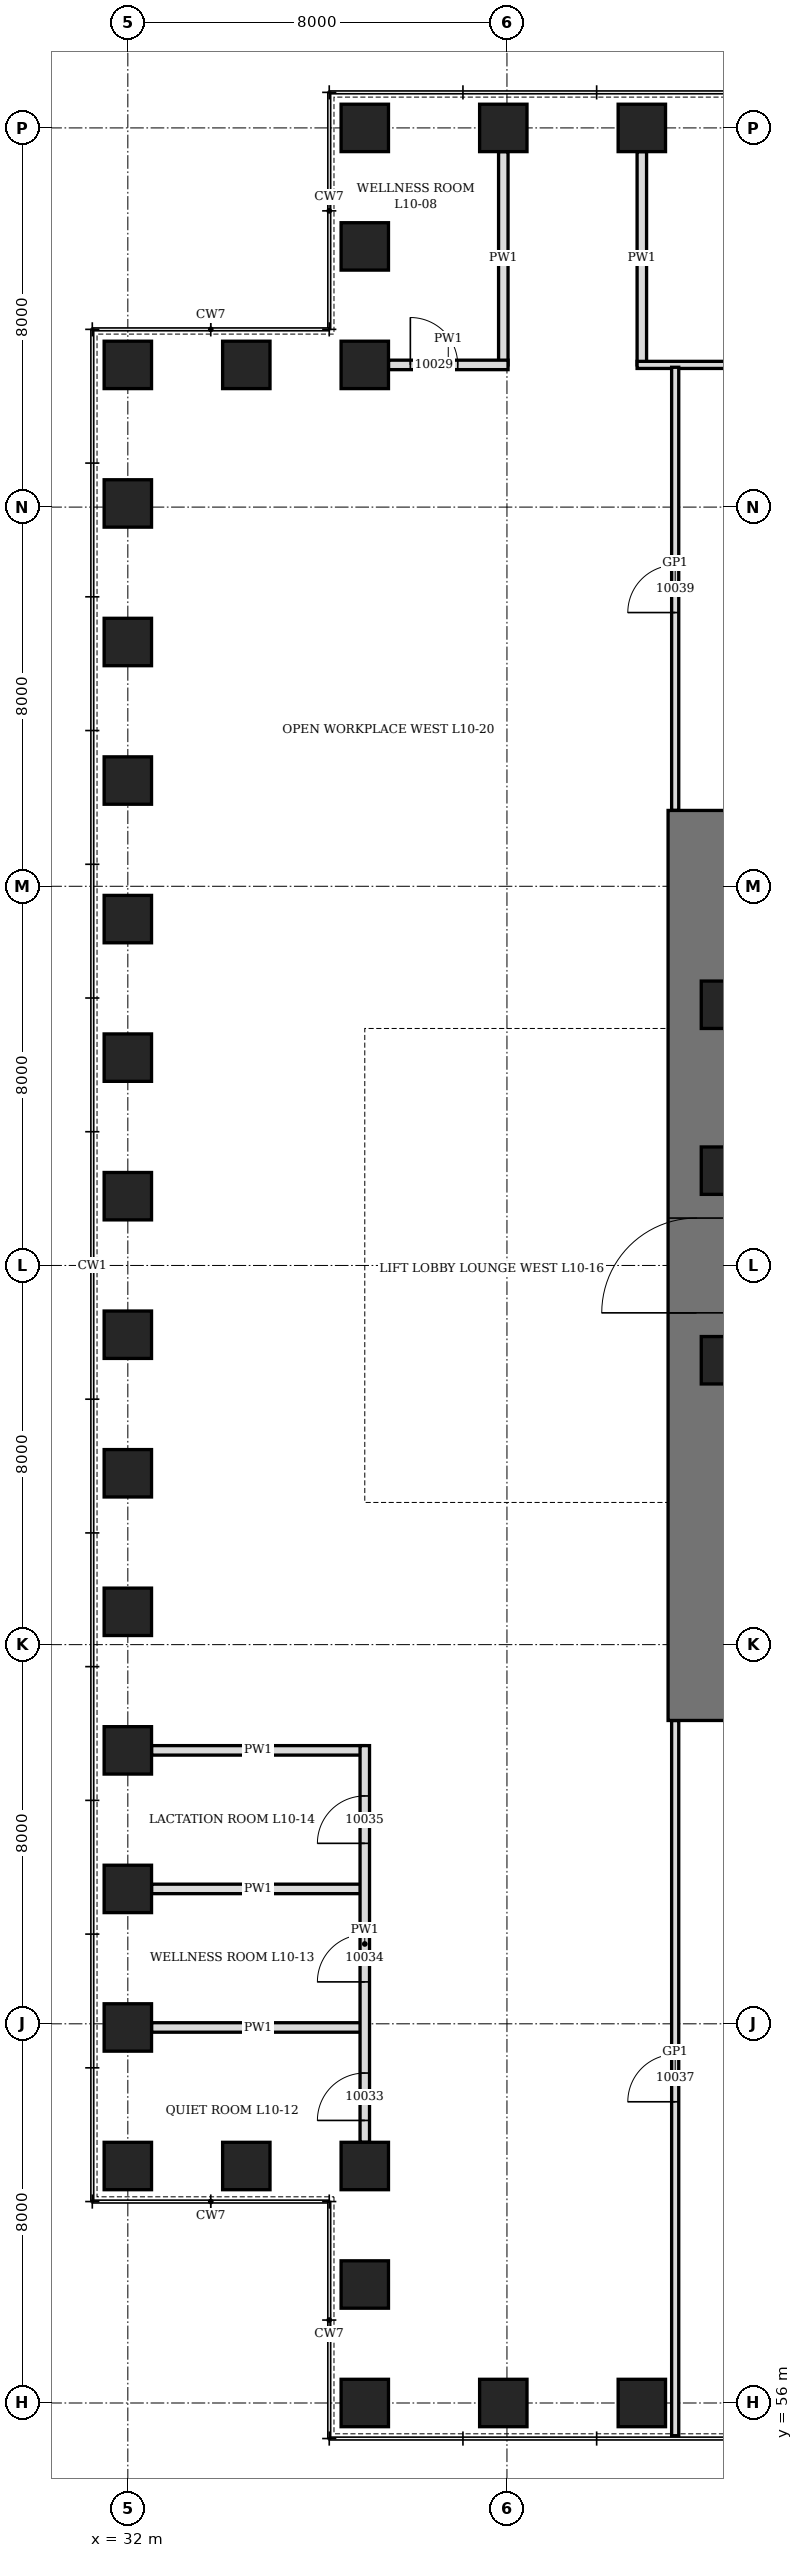
"""IFC4 building model, lengths in metres.
Left out: names, types, materials, properties, quantities, classifications, styles, units other than length and angle.
Written with IfcOpenShell. Run it as: python <this file> out.ifc"""

import sys

from ifc_helpers import new_model, si_unit, direction, frame, frame_2d, origin, origin_2d, place, context, subcontext, project, spatial, rectangle, hollow_rectangle, extrude, element, fill, save


model = new_model("IFC4")
c1 = context("Model", 3, precision=1e-05, world=origin(), true_north=direction((0.0, 1.0)))
c2 = subcontext(c1, "Body", "Model", "MODEL_VIEW")
j1 = project(units=[si_unit("LENGTHUNIT", "METRE"), si_unit("PLANEANGLEUNIT", "RADIAN")], contexts=[c1])
p1 = place(None, origin())
s1 = spatial("IfcSite", under=j1, at=p1, CompositionType="ELEMENT")
p2 = place(p1, origin())
s2 = spatial("IfcBuilding", under=s1, at=p2, CompositionType="ELEMENT")
p3 = place(p2, frame((0.0, 0.0, 51.7)))
s3 = spatial("IfcBuildingStorey", under=s2, at=p3, CompositionType="ELEMENT", Elevation=51.7)
for number, where, z_axis, x_axis in (
    (1, (37.0, 56.0, 0.0), (0.0, 0.0, 1.0), (1.0, 0.0, 0.0)),
    (2, (39.923, 56.0, 0.0), (0.0, 0.0, 1.0), (1.0, 0.0, 0.0)),
    (3, (42.846, 56.0, 0.0), (0.0, 0.0, 1.0), (1.0, 0.0, 0.0)),
    (4, (42.846, 104.0, 0.0), (0.0, 0.0, 1.0), (1.0, 0.0, 0.0)),
    (5, (39.923, 104.0, 0.0), (0.0, 0.0, 1.0), (1.0, 0.0, 0.0)),
    (6, (37.0, 104.0, 0.0), (0.0, 0.0, 1.0), (0.0, 1.0, 0.0)),
    (7, (37.0, 101.5, 0.0), (0.0, 0.0, 1.0), (0.0, 1.0, 0.0)),
    (8, (37.0, 99.0, 0.0), (0.0, 0.0, 1.0), (1.0, 0.0, 0.0)),
    (9, (34.5, 99.0, 0.0), (0.0, 0.0, 1.0), (1.0, 0.0, 0.0)),
    (10, (32.0, 99.0, 0.0), (0.0, 0.0, 1.0), (0.0, 1.0, 0.0)),
    (11, (32.0, 96.077, 0.0), (0.0, 0.0, 1.0), (0.0, 1.0, 0.0)),
    (12, (32.0, 93.154, 0.0), (0.0, 0.0, 1.0), (0.0, 1.0, 0.0)),
    (13, (32.0, 90.231, 0.0), (0.0, 0.0, 1.0), (0.0, 1.0, 0.0)),
    (14, (32.0, 87.308, 0.0), (0.0, 0.0, 1.0), (0.0, 1.0, 0.0)),
    (15, (32.0, 84.385, 0.0), (0.0, 0.0, 1.0), (0.0, 1.0, 0.0)),
    (16, (32.0, 81.461, 0.0), (0.0, 0.0, 1.0), (0.0, 1.0, 0.0)),
    (17, (32.0, 78.539, 0.0), (0.0, 0.0, 1.0), (0.0, 1.0, 0.0)),
    (18, (32.0, 75.615, 0.0), (0.0, 0.0, 1.0), (0.0, 1.0, 0.0)),
    (19, (32.0, 72.692, 0.0), (0.0, 0.0, 1.0), (0.0, 1.0, 0.0)),
    (20, (32.0, 69.769, 0.0), (0.0, 0.0, 1.0), (0.0, 1.0, 0.0)),
    (21, (32.0, 66.846, 0.0), (0.0, 0.0, 1.0), (0.0, 1.0, 0.0)),
    (22, (32.0, 63.923, 0.0), (0.0, 0.0, 1.0), (0.0, 1.0, 0.0)),
    (23, (32.0, 61.0, 0.0), (0.0, 0.0, 1.0), (1.0, 0.0, 0.0)),
    (24, (34.5, 61.0, 0.0), (0.0, 0.0, 1.0), (1.0, 0.0, 0.0)),
    (25, (37.0, 61.0, 0.0), (0.0, 0.0, 1.0), (0.0, 1.0, 0.0)),
    (26, (37.0, 58.5, 0.0), (0.0, 0.0, 1.0), (0.0, 1.0, 0.0)),
):
    element("IfcColumn", number, at=place(p3, frame(where, z_axis=z_axis, x_axis=x_axis)), inside=s3, PredefinedType="COLUMN", context=c2, shape_type="SweptSolid", body=[
        extrude(hollow_rectangle(XDim=1.0, YDim=1.0, WallThickness=0.25, at=origin_2d()), origin(), (0.0, 0.0, 1.0), 4.2),
    ])
p4 = place(p3, frame((44.0, 70.4, 0.0), z_axis=(0.0, 0.0, 1.0), x_axis=(0.0, 1.0, 0.0)))
e27 = element("IfcWall", 27, at=p4, inside=s3, PredefinedType="SHEAR", context=c2, shape_type="SweptSolid", body=[
    extrude(rectangle(XDim=19.2, YDim=1.2, at=frame_2d((9.6, 0.0))), origin(), (0.0, 0.0, 1.0), 4.2),
])
p5 = place(p4, frame((8.6, 0.0, 0.0)))
e28 = element("IfcOpeningElement", 28, at=p5, cuts=e27, PredefinedType="OPENING", context=c2, shape_type="SweptSolid", body=[
    extrude(rectangle(XDim=2.0, YDim=2.4, at=frame_2d((1.0, 1.2))), frame((0.0, 0.61, 0.0), z_axis=(0.0, -1.0, 0.0), x_axis=(1.0, 0.0, 0.0)), (0.0, 0.0, 1.0), 1.22),
])
for number, where, z_axis, x_axis in (
    (29, (44.6, 78.0, 0.0), (0.0, 0.0, 1.0), (1.0, 0.0, 0.0)),
    (30, (44.6, 82.0, 0.0), (0.0, 0.0, 1.0), (1.0, 0.0, 0.0)),
    (31, (44.6, 85.5, 0.0), (0.0, 0.0, 1.0), (1.0, 0.0, 0.0)),
):
    element("IfcColumn", number, at=place(p3, frame(where, z_axis=z_axis, x_axis=x_axis)), inside=s3, PredefinedType="COLUMN", context=c2, shape_type="SweptSolid", body=[
        extrude(hollow_rectangle(XDim=1.0, YDim=1.0, WallThickness=0.15, at=origin_2d()), origin(), (0.0, 0.0, 1.0), 4.2),
    ])
p6 = place(p3, frame((39.923, 99.0, 0.0), z_axis=(0.0, 0.0, 1.0), x_axis=(0.0, 1.0, 0.0)))
e32 = element("IfcWall", 32, at=p6, inside=s3, PredefinedType="PARTITIONING", context=c2, shape_type="SweptSolid", body=[
    extrude(rectangle(XDim=4.5, YDim=0.2, at=frame_2d((2.25, 0.0))), origin(), (0.0, 0.0, 1.0), 3.428),
])
p7 = place(p3, frame((42.846, 99.0, 0.0), z_axis=(0.0, 0.0, 1.0), x_axis=(0.0, 1.0, 0.0)))
e33 = element("IfcWall", 33, at=p7, inside=s3, PredefinedType="PARTITIONING", context=c2, shape_type="SweptSolid", body=[
    extrude(rectangle(XDim=4.5, YDim=0.2, at=frame_2d((2.25, 0.0))), origin(), (0.0, 0.0, 1.0), 3.278),
])
for number, where, z_axis, x_axis in (
    (34, (32.5, 63.923, 0.0), (0.0, 0.0, 1.0), (1.0, 0.0, 0.0)),
    (35, (32.5, 66.846, 0.0), (0.0, 0.0, 1.0), (1.0, 0.0, 0.0)),
    (36, (32.5, 69.769, 0.0), (0.0, 0.0, 1.0), (1.0, 0.0, 0.0)),
):
    element("IfcWall", number, at=place(p3, frame(where, z_axis=z_axis, x_axis=x_axis)), inside=s3, PredefinedType="PARTITIONING", context=c2, shape_type="SweptSolid", body=[
        extrude(rectangle(XDim=4.5, YDim=0.2, at=frame_2d((2.25, 0.0))), origin(), (0.0, 0.0, 1.0), 3.428),
    ])
p8 = place(p3, frame((42.746, 99.0, 0.0), z_axis=(0.0, 0.0, 1.0), x_axis=(1.0, 0.0, 0.0)))
e37 = element("IfcWall", 37, at=p8, inside=s3, PredefinedType="PARTITIONING", context=c2, shape_type="SweptSolid", body=[
    extrude(rectangle(XDim=8.969, YDim=0.15, at=frame_2d((4.485, 0.0))), origin(), (0.0, 0.0, 1.0), 4.04),
])
p9 = place(p8, frame((3.985, 0.0, 0.0)))
e38 = element("IfcOpeningElement", 38, at=p9, cuts=e37, PredefinedType="OPENING", context=c2, shape_type="SweptSolid", body=[
    extrude(rectangle(XDim=1.0, YDim=2.4, at=frame_2d((0.5, 1.2))), frame((0.0, 0.085, 0.0), z_axis=(0.0, -1.0, 0.0), x_axis=(1.0, 0.0, 0.0)), (0.0, 0.0, 1.0), 0.17),
])
p10 = place(p3, frame((37.5, 99.0, 0.0), z_axis=(0.0, 0.0, 1.0), x_axis=(1.0, 0.0, 0.0)))
e39 = element("IfcWall", 39, at=p10, inside=s3, PredefinedType="PARTITIONING", context=c2, shape_type="SweptSolid", body=[
    extrude(rectangle(XDim=2.523, YDim=0.2, at=frame_2d((1.262, 0.0))), origin(), (0.0, 0.0, 1.0), 4.04),
])
p11 = place(p10, frame((0.461, 0.0, 0.0)))
e40 = element("IfcOpeningElement", 40, at=p11, cuts=e39, PredefinedType="OPENING", context=c2, shape_type="SweptSolid", body=[
    extrude(rectangle(XDim=1.0, YDim=2.1, at=frame_2d((0.5, 1.05))), frame((0.0, 0.11, 0.0), z_axis=(0.0, -1.0, 0.0), x_axis=(1.0, 0.0, 0.0)), (0.0, 0.0, 1.0), 0.22),
])
p12 = place(p3, frame((37.0, 61.5, 0.0), z_axis=(0.0, 0.0, 1.0), x_axis=(0.0, 1.0, 0.0)))
e41 = element("IfcWall", 41, at=p12, inside=s3, PredefinedType="PARTITIONING", context=c2, shape_type="SweptSolid", body=[
    extrude(rectangle(XDim=8.369, YDim=0.2, at=frame_2d((4.185, 0.0))), origin(), (0.0, 0.0, 1.0), 4.04),
])
p13 = place(p12, frame((0.461, 0.0, 0.0)))
e42 = element("IfcOpeningElement", 42, at=p13, cuts=e41, PredefinedType="OPENING", context=c2, shape_type="SweptSolid", body=[
    extrude(rectangle(XDim=1.0, YDim=2.1, at=frame_2d((0.5, 1.05))), frame((0.0, 0.11, 0.0), z_axis=(0.0, -1.0, 0.0), x_axis=(1.0, 0.0, 0.0)), (0.0, 0.0, 1.0), 0.22),
])
p14 = place(p12, frame((3.385, 0.0, 0.0)))
e43 = element("IfcOpeningElement", 43, at=p14, cuts=e41, PredefinedType="OPENING", context=c2, shape_type="SweptSolid", body=[
    extrude(rectangle(XDim=1.0, YDim=2.1, at=frame_2d((0.5, 1.05))), frame((0.0, 0.11, 0.0), z_axis=(0.0, -1.0, 0.0), x_axis=(1.0, 0.0, 0.0)), (0.0, 0.0, 1.0), 0.22),
])
p15 = place(p12, frame((6.308, 0.0, 0.0)))
e44 = element("IfcOpeningElement", 44, at=p15, cuts=e41, PredefinedType="OPENING", context=c2, shape_type="SweptSolid", body=[
    extrude(rectangle(XDim=1.0, YDim=2.1, at=frame_2d((0.5, 1.05))), frame((0.0, 0.11, 0.0), z_axis=(0.0, -1.0, 0.0), x_axis=(1.0, 0.0, 0.0)), (0.0, 0.0, 1.0), 0.22),
])
p16 = place(p3, frame((43.55, 55.31, 0.0), z_axis=(0.0, 0.0, 1.0), x_axis=(0.0, 1.0, 0.0)))
e45 = element("IfcWall", 45, at=p16, inside=s3, PredefinedType="PARTITIONING", context=c2, shape_type="SweptSolid", body=[
    extrude(rectangle(XDim=15.09, YDim=0.15, at=frame_2d((7.545, 0.0))), origin(), (0.0, 0.0, 1.0), 4.04),
])
p17 = place(p16, frame((7.045, 0.0, 0.0)))
e46 = element("IfcOpeningElement", 46, at=p17, cuts=e45, PredefinedType="OPENING", context=c2, shape_type="SweptSolid", body=[
    extrude(rectangle(XDim=1.0, YDim=2.4, at=frame_2d((0.5, 1.2))), frame((0.0, 0.085, 0.0), z_axis=(0.0, -1.0, 0.0), x_axis=(1.0, 0.0, 0.0)), (0.0, 0.0, 1.0), 0.17),
])
p18 = place(p3, frame((43.55, 89.6, 0.0), z_axis=(0.0, 0.0, 1.0), x_axis=(0.0, 1.0, 0.0)))
e47 = element("IfcWall", 47, at=p18, inside=s3, PredefinedType="PARTITIONING", context=c2, shape_type="SweptSolid", body=[
    extrude(rectangle(XDim=9.35, YDim=0.15, at=frame_2d((4.675, 0.0))), origin(), (0.0, 0.0, 1.0), 4.04),
])
p19 = place(p18, frame((4.175, 0.0, 0.0)))
e48 = element("IfcOpeningElement", 48, at=p19, cuts=e47, PredefinedType="OPENING", context=c2, shape_type="SweptSolid", body=[
    extrude(rectangle(XDim=1.0, YDim=2.4, at=frame_2d((0.5, 1.2))), frame((0.0, 0.085, 0.0), z_axis=(0.0, -1.0, 0.0), x_axis=(1.0, 0.0, 0.0)), (0.0, 0.0, 1.0), 0.17),
])
p20 = place(p5, origin())
e49 = element("IfcDoor", 49, at=p20, inside=s3, OperationType="DOUBLE_DOOR_SINGLE_SWING", PredefinedType="DOOR", context=c2, shape_type="SweptSolid", body=[
    extrude(rectangle(XDim=2.0, YDim=2.4, at=frame_2d((1.0, 1.2))), frame((0.0, 0.35, 0.0), z_axis=(0.0, -1.0, 0.0), x_axis=(1.0, 0.0, 0.0)), (0.0, 0.0, 1.0), 0.7),
])
fill(e28, e49)
p21 = place(p11, origin())
e50 = element("IfcDoor", 50, at=p21, inside=s3, OperationType="SINGLE_SWING_LEFT", PredefinedType="DOOR", context=c2, shape_type="SweptSolid", body=[
    extrude(rectangle(XDim=1.0, YDim=2.1, at=frame_2d((0.5, 1.05))), frame((0.0, 0.1, 0.0), z_axis=(0.0, -1.0, 0.0), x_axis=(1.0, 0.0, 0.0)), (0.0, 0.0, 1.0), 0.199),
])
fill(e40, e50)
p22 = place(p13, origin())
e51 = element("IfcDoor", 51, at=p22, inside=s3, OperationType="SINGLE_SWING_LEFT", PredefinedType="DOOR", context=c2, shape_type="SweptSolid", body=[
    extrude(rectangle(XDim=1.0, YDim=2.1, at=frame_2d((0.5, 1.05))), frame((0.0, 0.1, 0.0), z_axis=(0.0, -1.0, 0.0), x_axis=(1.0, 0.0, 0.0)), (0.0, 0.0, 1.0), 0.199),
])
fill(e42, e51)
p23 = place(p14, origin())
e52 = element("IfcDoor", 52, at=p23, inside=s3, OperationType="SINGLE_SWING_LEFT", PredefinedType="DOOR", context=c2, shape_type="SweptSolid", body=[
    extrude(rectangle(XDim=1.0, YDim=2.1, at=frame_2d((0.5, 1.05))), frame((0.0, 0.1, 0.0), z_axis=(0.0, -1.0, 0.0), x_axis=(1.0, 0.0, 0.0)), (0.0, 0.0, 1.0), 0.199),
])
fill(e43, e52)
p24 = place(p15, origin())
e53 = element("IfcDoor", 53, at=p24, inside=s3, OperationType="SINGLE_SWING_LEFT", PredefinedType="DOOR", context=c2, shape_type="SweptSolid", body=[
    extrude(rectangle(XDim=1.0, YDim=2.1, at=frame_2d((0.5, 1.05))), frame((0.0, 0.1, 0.0), z_axis=(0.0, -1.0, 0.0), x_axis=(1.0, 0.0, 0.0)), (0.0, 0.0, 1.0), 0.199),
])
fill(e44, e53)
p25 = place(p17, origin())
e54 = element("IfcDoor", 54, at=p25, inside=s3, OperationType="SINGLE_SWING_RIGHT", PredefinedType="DOOR", context=c2, shape_type="SweptSolid", body=[
    extrude(rectangle(XDim=1.0, YDim=2.4, at=frame_2d((0.5, 1.2))), frame((0.0, 0.075, 0.0), z_axis=(0.0, -1.0, 0.0), x_axis=(1.0, 0.0, 0.0)), (0.0, 0.0, 1.0), 0.149),
])
fill(e46, e54)
p26 = place(p19, origin())
e55 = element("IfcDoor", 55, at=p26, inside=s3, OperationType="SINGLE_SWING_RIGHT", PredefinedType="DOOR", context=c2, shape_type="SweptSolid", body=[
    extrude(rectangle(XDim=1.0, YDim=2.4, at=frame_2d((0.5, 1.2))), frame((0.0, 0.075, 0.0), z_axis=(0.0, -1.0, 0.0), x_axis=(1.0, 0.0, 0.0)), (0.0, 0.0, 1.0), 0.149),
])
fill(e48, e55)
save(model, sys.argv[1])
